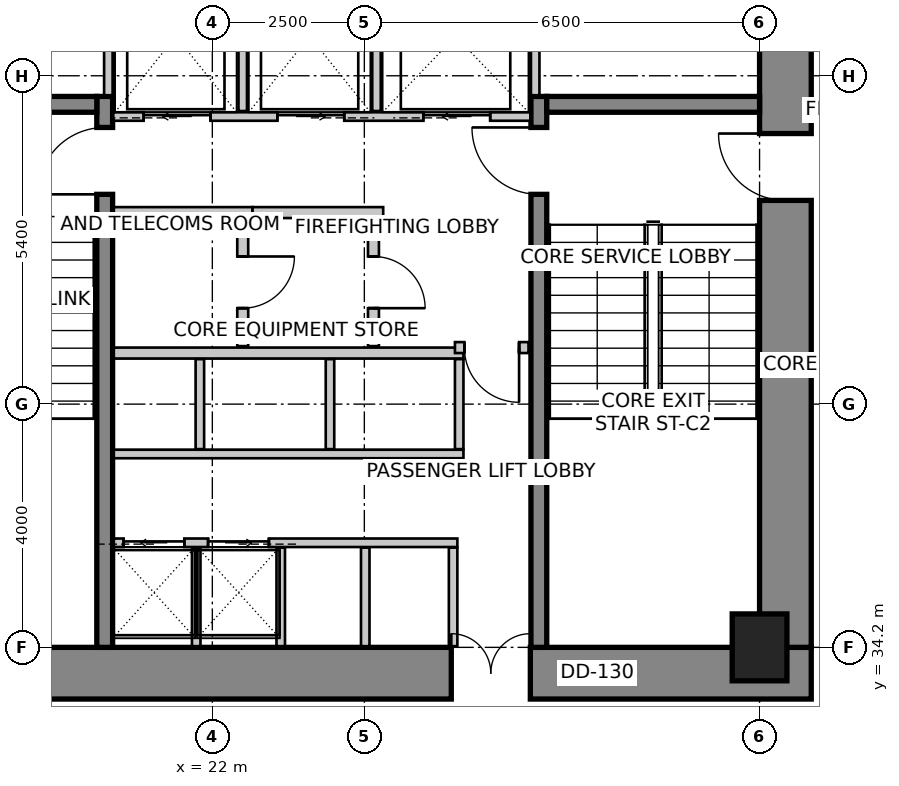
"""IFC4 building model, lengths in metres.
Left out: names, types, materials, properties, quantities, classifications, styles, units other than length and angle.
Written with IfcOpenShell. Run it as: python <this file> out.ifc"""

import sys

from ifc_helpers import new_model, si_unit, direction, frame, frame_2d, origin, origin_2d, place, context, subcontext, project, spatial, rectangle, extrude, source, transform, mapped, element, fill, save


model = new_model("IFC4")
c1 = context("Model", 3, precision=1e-05, world=origin(), true_north=direction((0.0, 1.0)))
c2 = subcontext(c1, "Body", "Model", "MODEL_VIEW")
j1 = project(units=[si_unit("LENGTHUNIT", "METRE"), si_unit("PLANEANGLEUNIT", "RADIAN")], contexts=[c1])
p1 = place(None, origin())
s1 = spatial("IfcSite", under=j1, at=p1, CompositionType="ELEMENT")
p2 = place(p1, origin())
s2 = spatial("IfcBuilding", under=s1, at=p2, CompositionType="ELEMENT")
p3 = place(p2, frame((0.0, 0.0, 47.0)))
s3 = spatial("IfcBuildingStorey", under=s2, at=p3, CompositionType="ELEMENT", Elevation=47.0)
p4 = place(p3, frame((15.75, 33.775, 0.0), z_axis=(0.0, 0.0, 1.0), x_axis=(1.0, 0.0, 0.0)))
e1 = element("IfcWall", 1, at=p4, inside=s3, PredefinedType="SHEAR", context=c2, shape_type="SweptSolid", body=[
    extrude(rectangle(XDim=16.1, YDim=0.85, at=frame_2d((8.05, 0.0))), origin(), (0.0, 0.0, 1.0), 4.0),
])
m1 = source(origin(), c2, "Body", "SweptSolid", [
    extrude(rectangle(XDim=1.3, YDim=2.15, at=frame_2d((0.65, 1.075))), frame((0.0, 0.435, 0.0), z_axis=(0.0, -1.0, 0.0), x_axis=(1.0, 0.0, 0.0)), (0.0, 0.0, 1.0), 0.87),
])
p5 = place(p4, frame((10.18, 0.0, 0.0)))
e2 = element("IfcOpeningElement", 2, at=p5, cuts=e1, PredefinedType="OPENING", context=c2, shape_type="MappedRepresentation", body=[
    mapped(m1, transform((0.0, 0.0, 0.0), scale=1.0)),
])
p6 = place(p3, frame((31.425, 34.2, 0.0), z_axis=(0.0, 0.0, 1.0), x_axis=(0.0, 1.0, 0.0)))
e3 = element("IfcWall", 3, at=p6, inside=s3, PredefinedType="SHEAR", context=c2, shape_type="SweptSolid", body=[
    extrude(rectangle(XDim=11.4, YDim=0.85, at=frame_2d((5.7, 0.0))), origin(), (0.0, 0.0, 1.0), 4.0),
])
m2 = source(origin(), c2, "Body", "SweptSolid", [
    extrude(rectangle(XDim=1.1, YDim=2.15, at=frame_2d((0.55, 1.075))), frame((0.0, 0.435, 0.0), z_axis=(0.0, -1.0, 0.0), x_axis=(1.0, 0.0, 0.0)), (0.0, 0.0, 1.0), 0.87),
])
p7 = place(p6, frame((7.35, 0.0, 0.0)))
e4 = element("IfcOpeningElement", 4, at=p7, cuts=e3, PredefinedType="OPENING", context=c2, shape_type="MappedRepresentation", body=[
    mapped(m2, transform((0.0, 0.0, 0.0), scale=1.0)),
])
p8 = place(p3, frame((20.23, 34.2, 0.0), z_axis=(0.0, 0.0, 1.0), x_axis=(0.0, 1.0, 0.0)))
e5 = element("IfcWall", 5, at=p8, inside=s3, PredefinedType="SHEAR", context=c2, shape_type="SweptSolid", body=[
    extrude(rectangle(XDim=9.06, YDim=0.26, at=frame_2d((4.53, 0.0))), origin(), (0.0, 0.0, 1.0), 4.0),
])
m3 = source(origin(), c2, "Body", "SweptSolid", [
    extrude(rectangle(XDim=1.1, YDim=2.15, at=frame_2d((0.55, 1.075))), frame((0.0, 0.14, 0.0), z_axis=(0.0, -1.0, 0.0), x_axis=(1.0, 0.0, 0.0)), (0.0, 0.0, 1.0), 0.28),
])
p9 = place(p8, frame((7.45, 0.0, 0.0)))
e6 = element("IfcOpeningElement", 6, at=p9, cuts=e5, PredefinedType="OPENING", context=c2, shape_type="MappedRepresentation", body=[
    mapped(m3, transform((0.0, 0.0, 0.0), scale=1.0)),
])
p10 = place(p3, frame((27.37, 34.2, 0.0), z_axis=(0.0, 0.0, 1.0), x_axis=(0.0, 1.0, 0.0)))
e7 = element("IfcWall", 7, at=p10, inside=s3, PredefinedType="SHEAR", context=c2, shape_type="SweptSolid", body=[
    extrude(rectangle(XDim=9.06, YDim=0.26, at=frame_2d((4.53, 0.0))), origin(), (0.0, 0.0, 1.0), 4.0),
])
p11 = place(p10, frame((7.45, 0.0, 0.0)))
e8 = element("IfcOpeningElement", 8, at=p11, cuts=e7, PredefinedType="OPENING", context=c2, shape_type="MappedRepresentation", body=[
    mapped(m3, transform((0.0, 0.0, 0.0), scale=1.0)),
])
for number, where, z_axis, x_axis in (
    (9, (16.6, 43.13, 0.0), (0.0, 0.0, 1.0), (1.0, 0.0, 0.0)),
    (10, (27.5, 43.13, 0.0), (0.0, 0.0, 1.0), (1.0, 0.0, 0.0)),
):
    element("IfcWall", number, at=place(p3, frame(where, z_axis=z_axis, x_axis=x_axis)), inside=s3, PredefinedType="SHEAR", context=c2, shape_type="SweptSolid", body=[
        extrude(rectangle(XDim=3.5, YDim=0.26, at=frame_2d((1.75, 0.0))), origin(), (0.0, 0.0, 1.0), 4.0),
    ])
m4 = source(origin(), c2, "Body", "SweptSolid", [
    extrude(rectangle(XDim=0.9, YDim=1.1, at=origin_2d()), origin(), (0.0, 0.0, 1.0), 4.0),
])
p12 = place(p3, frame((31.0, 34.2, 0.0), z_axis=(0.0, 0.0, 1.0), x_axis=(1.0, 0.0, 0.0)))
e11 = element("IfcColumn", 11, at=p12, inside=s3, PredefinedType="COLUMN", context=c2, shape_type="MappedRepresentation", body=[
    mapped(m4, transform((0.0, 0.0, 0.0), scale=1.0)),
])
p13 = place(p3, frame((20.37, 42.93, 0.0), z_axis=(0.0, 0.0, 1.0), x_axis=(1.0, 0.0, 0.0)))
e12 = element("IfcWall", 12, at=p13, inside=s3, PredefinedType="SOLIDWALL", context=c2, shape_type="SweptSolid", body=[
    extrude(rectangle(XDim=6.86, YDim=0.14, at=frame_2d((3.43, 0.0))), origin(), (0.0, 0.0, 1.0), 3.75),
])
m5 = source(origin(), c2, "Body", "SweptSolid", [
    extrude(rectangle(XDim=1.1, YDim=2.15, at=frame_2d((0.55, 1.075))), frame((0.0, 0.08, 0.0), z_axis=(0.0, -1.0, 0.0), x_axis=(1.0, 0.0, 0.0)), (0.0, 0.0, 1.0), 0.16),
])
p14 = place(p13, frame((0.5, 0.0, 0.0)))
e13 = element("IfcOpeningElement", 13, at=p14, cuts=e12, PredefinedType="OPENING", context=c2, shape_type="MappedRepresentation", body=[
    mapped(m5, transform((0.0, 0.0, 0.0), scale=1.0)),
])
p15 = place(p13, frame((2.7, 0.0, 0.0)))
e14 = element("IfcOpeningElement", 14, at=p15, cuts=e12, PredefinedType="OPENING", context=c2, shape_type="MappedRepresentation", body=[
    mapped(m5, transform((0.0, 0.0, 0.0), scale=1.0)),
])
p16 = place(p13, frame((5.1, 0.0, 0.0)))
e15 = element("IfcOpeningElement", 15, at=p16, cuts=e12, PredefinedType="OPENING", context=c2, shape_type="MappedRepresentation", body=[
    mapped(m5, transform((0.0, 0.0, 0.0), scale=1.0)),
])
for number, where, z_axis, x_axis in (
    (16, (20.29, 43.28, 0.0), (0.0, 0.0, 1.0), (0.0, 1.0, 0.0)),
    (17, (27.31, 43.28, 0.0), (0.0, 0.0, 1.0), (0.0, 1.0, 0.0)),
):
    element("IfcWall", number, at=place(p3, frame(where, z_axis=z_axis, x_axis=x_axis)), inside=s3, PredefinedType="SOLIDWALL", context=c2, shape_type="SweptSolid", body=[
        extrude(rectangle(XDim=2.3, YDim=0.14, at=frame_2d((1.15, 0.0))), origin(), (0.0, 0.0, 1.0), 3.75),
    ])
for number, where, z_axis, x_axis in (
    (18, (22.5, 43.02, 0.0), (0.0, 0.0, 1.0), (0.0, 1.0, 0.0)),
    (19, (24.7, 43.02, 0.0), (0.0, 0.0, 1.0), (0.0, 1.0, 0.0)),
):
    element("IfcWall", number, at=place(p3, frame(where, z_axis=z_axis, x_axis=x_axis)), inside=s3, PredefinedType="SOLIDWALL", context=c2, shape_type="SweptSolid", body=[
        extrude(rectangle(XDim=2.56, YDim=0.14, at=frame_2d((1.28, 0.0))), origin(), (0.0, 0.0, 1.0), 3.75),
    ])
p17 = place(p3, frame((20.38, 35.92, 0.0), z_axis=(0.0, 0.0, 1.0), x_axis=(1.0, 0.0, 0.0)))
e20 = element("IfcWall", 20, at=p17, inside=s3, PredefinedType="SOLIDWALL", context=c2, shape_type="SweptSolid", body=[
    extrude(rectangle(XDim=5.65, YDim=0.14, at=frame_2d((2.825, 0.0))), origin(), (0.0, 0.0, 1.0), 3.75),
])
m6 = source(origin(), c2, "Body", "SweptSolid", [
    extrude(rectangle(XDim=1.0, YDim=2.15, at=frame_2d((0.5, 1.075))), frame((0.0, 0.08, 0.0), z_axis=(0.0, -1.0, 0.0), x_axis=(1.0, 0.0, 0.0)), (0.0, 0.0, 1.0), 0.16),
])
p18 = place(p17, frame((0.16, 0.0, 0.0)))
e21 = element("IfcOpeningElement", 21, at=p18, cuts=e20, PredefinedType="OPENING", context=c2, shape_type="MappedRepresentation", body=[
    mapped(m6, transform((0.0, 0.0, 0.0), scale=1.0)),
])
p19 = place(p17, frame((1.55, 0.0, 0.0)))
e22 = element("IfcOpeningElement", 22, at=p19, cuts=e20, PredefinedType="OPENING", context=c2, shape_type="MappedRepresentation", body=[
    mapped(m6, transform((0.0, 0.0, 0.0), scale=1.0)),
])
for number, where, z_axis, x_axis in (
    (23, (25.96, 34.22, 0.0), (0.0, 0.0, 1.0), (0.0, 1.0, 0.0)),
    (24, (21.735, 34.22, 0.0), (0.0, 0.0, 1.0), (0.0, 1.0, 0.0)),
    (25, (23.125, 34.22, 0.0), (0.0, 0.0, 1.0), (0.0, 1.0, 0.0)),
    (26, (24.515, 34.22, 0.0), (0.0, 0.0, 1.0), (0.0, 1.0, 0.0)),
):
    element("IfcWall", number, at=place(p3, frame(where, z_axis=z_axis, x_axis=x_axis)), inside=s3, PredefinedType="SOLIDWALL", context=c2, shape_type="SweptSolid", body=[
        extrude(rectangle(XDim=1.62, YDim=0.14, at=frame_2d((0.81, 0.0))), origin(), (0.0, 0.0, 1.0), 3.042),
    ])
p20 = place(p3, frame((20.38, 37.38, 0.0), z_axis=(0.0, 0.0, 1.0), x_axis=(1.0, 0.0, 0.0)))
e27 = element("IfcWall", 27, at=p20, inside=s3, PredefinedType="SOLIDWALL", context=c2, shape_type="SweptSolid", body=[
    extrude(rectangle(XDim=5.75, YDim=0.14, at=frame_2d((2.875, 0.0))), origin(), (0.0, 0.0, 1.0), 3.75),
])
p21 = place(p3, frame((20.38, 39.04, 0.0), z_axis=(0.0, 0.0, 1.0), x_axis=(1.0, 0.0, 0.0)))
e28 = element("IfcWall", 28, at=p21, inside=s3, PredefinedType="SOLIDWALL", context=c2, shape_type="SweptSolid", body=[
    extrude(rectangle(XDim=5.75, YDim=0.18, at=frame_2d((2.875, 0.0))), origin(), (0.0, 0.0, 1.0), 3.75),
])
for number, where, z_axis, x_axis in (
    (29, (26.06, 37.46, 0.0), (0.0, 0.0, 1.0), (0.0, 1.0, 0.0)),
    (30, (21.795, 37.46, 0.0), (0.0, 0.0, 1.0), (0.0, 1.0, 0.0)),
    (31, (23.935, 37.46, 0.0), (0.0, 0.0, 1.0), (0.0, 1.0, 0.0)),
):
    element("IfcWall", number, at=place(p3, frame(where, z_axis=z_axis, x_axis=x_axis)), inside=s3, PredefinedType="SOLIDWALL", context=c2, shape_type="SweptSolid", body=[
        extrude(rectangle(XDim=1.48, YDim=0.14, at=frame_2d((0.74, 0.0))), origin(), (0.0, 0.0, 1.0), 3.75),
    ])
p22 = place(p3, frame((22.66, 41.35, 0.0), z_axis=(0.0, 0.0, 1.0), x_axis=(-1.0, 0.0, 0.0)))
e32 = element("IfcWall", 32, at=p22, inside=s3, PredefinedType="PARTITIONING", context=c2, shape_type="SweptSolid", body=[
    extrude(rectangle(XDim=2.28, YDim=0.18, at=frame_2d((1.14, 0.0))), origin(), (0.0, 0.0, 1.0), 3.75),
])
p23 = place(p3, frame((24.81, 41.35, 0.0), z_axis=(0.0, 0.0, 1.0), x_axis=(-1.0, 0.0, 0.0)))
e33 = element("IfcWall", 33, at=p23, inside=s3, PredefinedType="PARTITIONING", context=c2, shape_type="SweptSolid", body=[
    extrude(rectangle(XDim=2.148, YDim=0.18, at=frame_2d((1.074, 0.0))), origin(), (0.0, 0.0, 1.0), 3.75),
])
p24 = place(p3, frame((22.5, 41.256, 0.0), z_axis=(0.0, 0.0, 1.0), x_axis=(0.0, -1.0, 0.0)))
e34 = element("IfcWall", 34, at=p24, inside=s3, PredefinedType="PARTITIONING", context=c2, shape_type="SweptSolid", body=[
    extrude(rectangle(XDim=2.106, YDim=0.18, at=frame_2d((1.053, 0.0))), origin(), (0.0, 0.0, 1.0), 3.75),
])
m7 = source(origin(), c2, "Body", "SweptSolid", [
    extrude(rectangle(XDim=0.85, YDim=2.15, at=frame_2d((0.425, 1.075))), frame((0.0, 0.1, 0.0), z_axis=(0.0, -1.0, 0.0), x_axis=(1.0, 0.0, 0.0)), (0.0, 0.0, 1.0), 0.2),
])
p25 = place(p24, frame((0.628, 0.0, 0.0)))
e35 = element("IfcOpeningElement", 35, at=p25, cuts=e34, PredefinedType="OPENING", context=c2, shape_type="MappedRepresentation", body=[
    mapped(m7, transform((0.0, 0.0, 0.0), scale=1.0)),
])
p26 = place(p3, frame((24.65, 41.256, 0.0), z_axis=(0.0, 0.0, 1.0), x_axis=(0.0, -1.0, 0.0)))
e36 = element("IfcWall", 36, at=p26, inside=s3, PredefinedType="PARTITIONING", context=c2, shape_type="SweptSolid", body=[
    extrude(rectangle(XDim=2.106, YDim=0.18, at=frame_2d((1.053, 0.0))), origin(), (0.0, 0.0, 1.0), 3.75),
])
p27 = place(p26, frame((0.628, 0.0, 0.0)))
e37 = element("IfcOpeningElement", 37, at=p27, cuts=e36, PredefinedType="OPENING", context=c2, shape_type="MappedRepresentation", body=[
    mapped(m7, transform((0.0, 0.0, 0.0), scale=1.0)),
])
p28 = place(p3, frame((27.2, 39.13, 0.0), z_axis=(0.0, 0.0, 1.0), x_axis=(-1.0, 0.0, 0.0)))
e38 = element("IfcWall", 38, at=p28, inside=s3, PredefinedType="PARTITIONING", context=c2, shape_type="SweptSolid", body=[
    extrude(rectangle(XDim=1.21, YDim=0.18, at=frame_2d((0.605, 0.0))), origin(), (0.0, 0.0, 1.0), 3.75),
])
m8 = source(origin(), c2, "Body", "SweptSolid", [
    extrude(rectangle(XDim=0.9, YDim=2.15, at=frame_2d((0.45, 1.075))), frame((0.0, 0.1, 0.0), z_axis=(0.0, -1.0, 0.0), x_axis=(1.0, 0.0, 0.0)), (0.0, 0.0, 1.0), 0.2),
])
p29 = place(p28, frame((0.155, 0.0, 0.0)))
e39 = element("IfcOpeningElement", 39, at=p29, cuts=e38, PredefinedType="OPENING", context=c2, shape_type="MappedRepresentation", body=[
    mapped(m8, transform((0.0, 0.0, 0.0), scale=1.0)),
])
m9 = source(origin(), c2, "Body", "SweptSolid", [
    extrude(rectangle(XDim=1.1, YDim=2.15, at=frame_2d((0.55, 1.075))), frame((0.0, 0.025, 0.0), z_axis=(0.0, -1.0, 0.0), x_axis=(1.0, 0.0, 0.0)), (0.0, 0.0, 1.0), 0.05),
])
p30 = place(p14, origin())
e40 = element("IfcDoor", 40, at=p30, inside=s3, OperationType="SLIDING_TO_LEFT", PredefinedType="DOOR", context=c2, shape_type="MappedRepresentation", body=[
    mapped(m9, transform((0.0, 0.0, 0.0), scale=1.0)),
])
fill(e13, e40)
p31 = place(p15, origin())
e41 = element("IfcDoor", 41, at=p31, inside=s3, OperationType="SLIDING_TO_RIGHT", PredefinedType="DOOR", context=c2, shape_type="MappedRepresentation", body=[
    mapped(m9, transform((0.0, 0.0, 0.0), scale=1.0)),
])
fill(e14, e41)
m10 = source(origin(), c2, "Body", "SweptSolid", [
    extrude(rectangle(XDim=1.1, YDim=2.15, at=frame_2d((0.55, 1.075))), frame((0.0, 0.025, 0.0), z_axis=(0.0, -1.0, 0.0), x_axis=(1.0, 0.0, 0.0)), (0.0, 0.0, 1.0), 0.05),
])
p32 = place(p16, origin())
e42 = element("IfcDoor", 42, at=p32, inside=s3, OperationType="SLIDING_TO_LEFT", PredefinedType="DOOR", context=c2, shape_type="MappedRepresentation", body=[
    mapped(m10, transform((0.0, 0.0, 0.0), scale=1.0)),
])
fill(e15, e42)
m11 = source(origin(), c2, "Body", "SweptSolid", [
    extrude(rectangle(XDim=1.0, YDim=2.15, at=frame_2d((0.5, 1.075))), frame((0.0, 0.025, 0.0), z_axis=(0.0, -1.0, 0.0), x_axis=(1.0, 0.0, 0.0)), (0.0, 0.0, 1.0), 0.05),
])
p33 = place(p18, origin())
e43 = element("IfcDoor", 43, at=p33, inside=s3, OperationType="SLIDING_TO_LEFT", PredefinedType="DOOR", context=c2, shape_type="MappedRepresentation", body=[
    mapped(m11, transform((0.0, 0.0, 0.0), scale=1.0)),
])
fill(e21, e43)
p34 = place(p19, origin())
e44 = element("IfcDoor", 44, at=p34, inside=s3, OperationType="SLIDING_TO_RIGHT", PredefinedType="DOOR", context=c2, shape_type="MappedRepresentation", body=[
    mapped(m11, transform((0.0, 0.0, 0.0), scale=1.0)),
])
fill(e22, e44)
m12 = source(origin(), c2, "Body", "SweptSolid", [
    extrude(rectangle(XDim=1.1, YDim=2.15, at=frame_2d((0.55, 1.075))), frame((0.0, 0.025, 0.0), z_axis=(0.0, -1.0, 0.0), x_axis=(1.0, 0.0, 0.0)), (0.0, 0.0, 1.0), 0.05),
])
p35 = place(p9, origin())
e45 = element("IfcDoor", 45, at=p35, inside=s3, OperationType="SINGLE_SWING_LEFT", PredefinedType="DOOR", context=c2, shape_type="MappedRepresentation", body=[
    mapped(m12, transform((0.0, 0.0, 0.0), scale=1.0)),
])
fill(e6, e45)
p36 = place(p11, origin())
e46 = element("IfcDoor", 46, at=p36, inside=s3, OperationType="SINGLE_SWING_RIGHT", PredefinedType="DOOR", context=c2, shape_type="MappedRepresentation", body=[
    mapped(m12, transform((0.0, 0.0, 0.0), scale=1.0)),
])
fill(e8, e46)
p37 = place(p7, origin())
e47 = element("IfcDoor", 47, at=p37, inside=s3, OperationType="SINGLE_SWING_RIGHT", PredefinedType="DOOR", context=c2, shape_type="MappedRepresentation", body=[
    mapped(m12, transform((0.0, 0.0, 0.0), scale=1.0)),
])
fill(e4, e47)
m13 = source(origin(), c2, "Body", "SweptSolid", [
    extrude(rectangle(XDim=1.3, YDim=2.15, at=frame_2d((0.65, 1.075))), frame((0.0, 0.025, 0.0), z_axis=(0.0, -1.0, 0.0), x_axis=(1.0, 0.0, 0.0)), (0.0, 0.0, 1.0), 0.05),
])
p38 = place(p5, origin())
e48 = element("IfcDoor", 48, at=p38, inside=s3, OperationType="DOUBLE_DOOR_SINGLE_SWING", PredefinedType="DOOR", context=c2, shape_type="MappedRepresentation", body=[
    mapped(m13, transform((0.0, 0.0, 0.0), scale=1.0)),
])
fill(e2, e48)
m14 = source(origin(), c2, "Body", "SweptSolid", [
    extrude(rectangle(XDim=0.85, YDim=2.15, at=frame_2d((0.425, 1.075))), frame((0.0, 0.025, 0.0), z_axis=(0.0, -1.0, 0.0), x_axis=(1.0, 0.0, 0.0)), (0.0, 0.0, 1.0), 0.05),
])
p39 = place(p25, origin())
e49 = element("IfcDoor", 49, at=p39, inside=s3, OperationType="SINGLE_SWING_LEFT", PredefinedType="DOOR", context=c2, shape_type="MappedRepresentation", body=[
    mapped(m14, transform((0.0, 0.0, 0.0), scale=1.0)),
])
fill(e35, e49)
p40 = place(p27, origin())
e50 = element("IfcDoor", 50, at=p40, inside=s3, OperationType="SINGLE_SWING_RIGHT", PredefinedType="DOOR", context=c2, shape_type="MappedRepresentation", body=[
    mapped(m14, transform((0.0, 0.0, 0.0), scale=1.0)),
])
fill(e37, e50)
m15 = source(origin(), c2, "Body", "SweptSolid", [
    extrude(rectangle(XDim=0.9, YDim=2.15, at=frame_2d((0.45, 1.075))), frame((0.0, 0.025, 0.0), z_axis=(0.0, -1.0, 0.0), x_axis=(1.0, 0.0, 0.0)), (0.0, 0.0, 1.0), 0.05),
])
p41 = place(p29, origin())
e51 = element("IfcDoor", 51, at=p41, inside=s3, OperationType="SINGLE_SWING_LEFT", PredefinedType="DOOR", context=c2, shape_type="MappedRepresentation", body=[
    mapped(m15, transform((0.0, 0.0, 0.0), scale=1.0)),
])
fill(e39, e51)
save(model, sys.argv[1])
